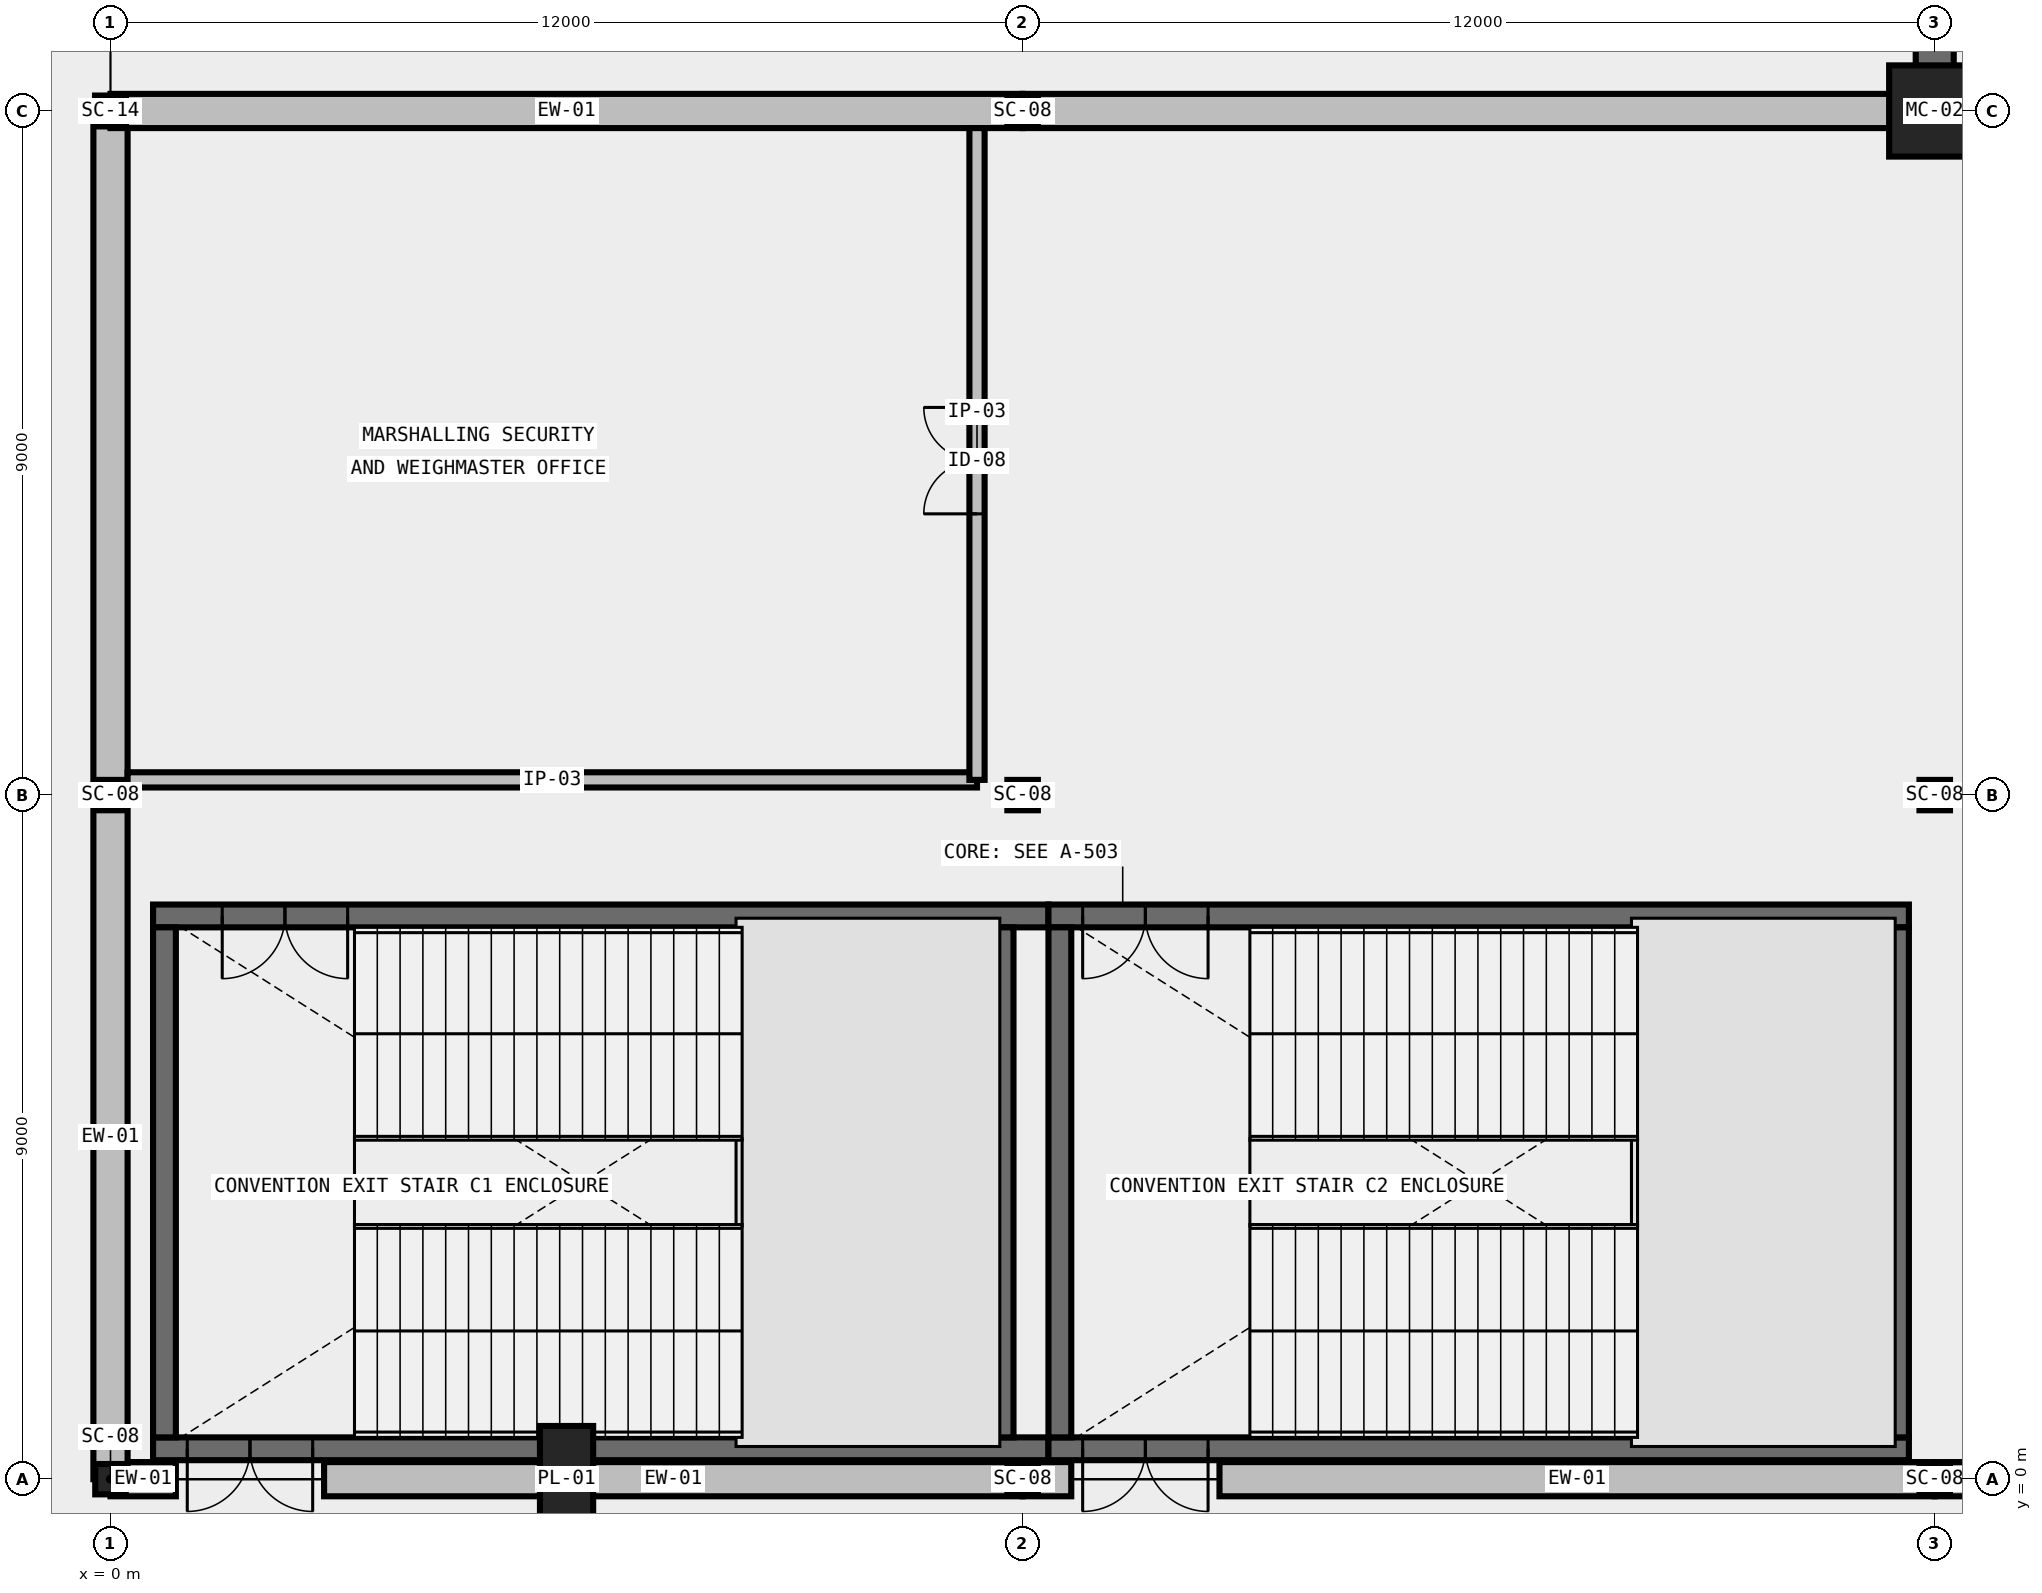
"""IFC4 building model, lengths in metres.
Left out: names, types, materials, properties, quantities, classifications, styles, units other than length and angle.
Written with IfcOpenShell. Run it as: python <this file> out.ifc"""

import sys

from ifc_helpers import new_model, si_unit, direction, frame, frame_2d, origin, origin_with_axes, origin_2d, place, context, subcontext, project, spatial, rectangle, hollow_rectangle, i_section, extrude, element, fill, save


model = new_model("IFC4")
c1 = context("Model", 3, precision=1e-05, world=origin(), true_north=direction((0.0, 1.0)))
c2 = subcontext(c1, "Body", "Model", "MODEL_VIEW")
j1 = project(units=[si_unit("LENGTHUNIT", "METRE"), si_unit("PLANEANGLEUNIT", "RADIAN")], contexts=[c1])
p1 = place(None, origin())
s1 = spatial("IfcSite", under=j1, at=p1, CompositionType="ELEMENT")
p2 = place(p1, origin())
s2 = spatial("IfcBuilding", under=s1, at=p2, CompositionType="ELEMENT")
p3 = place(p2, origin())
s3 = spatial("IfcBuildingStorey", under=s2, at=p3, CompositionType="ELEMENT", Elevation=0.0)
for number, where, z_axis, x_axis in (
    (1, (0.0, 0.0, 0.0), (0.0, 0.0, 1.0), (1.0, 0.0, 0.0)),
    (2, (0.0, 9.0, 0.0), (0.0, 0.0, 1.0), (1.0, 0.0, 0.0)),
):
    element("IfcColumn", number, at=place(p3, frame(where, z_axis=z_axis, x_axis=x_axis)), inside=s3, PredefinedType="COLUMN", context=c2, shape_type="SweptSolid", body=[
        extrude(i_section(OverallWidth=0.401, OverallDepth=0.399, WebThickness=0.025, FlangeThickness=0.04, FilletRadius=0.031, at=origin_2d()), origin(), (0.0, 0.0, 1.0), 6.0),
    ])
p4 = place(p3, frame((0.0, 18.0, 0.0), z_axis=(0.0, 0.0, 1.0), x_axis=(1.0, 0.0, 0.0)))
e3 = element("IfcColumn", 3, at=p4, inside=s3, PredefinedType="COLUMN", context=c2, shape_type="SweptSolid", body=[
    extrude(hollow_rectangle(XDim=0.406, YDim=0.406, WallThickness=0.015, at=origin_2d()), origin(), (0.0, 0.0, 1.0), 6.0),
])
for number, where, z_axis, x_axis in (
    (4, (12.0, 0.0, 0.0), (0.0, 0.0, 1.0), (1.0, 0.0, 0.0)),
    (5, (12.0, 9.0, 0.0), (0.0, 0.0, 1.0), (1.0, 0.0, 0.0)),
    (6, (12.0, 18.0, 0.0), (0.0, 0.0, 1.0), (1.0, 0.0, 0.0)),
    (7, (24.0, 0.0, 0.0), (0.0, 0.0, 1.0), (1.0, 0.0, 0.0)),
    (8, (24.0, 9.0, 0.0), (0.0, 0.0, 1.0), (1.0, 0.0, 0.0)),
):
    element("IfcColumn", number, at=place(p3, frame(where, z_axis=z_axis, x_axis=x_axis)), inside=s3, PredefinedType="COLUMN", context=c2, shape_type="SweptSolid", body=[
        extrude(i_section(OverallWidth=0.401, OverallDepth=0.399, WebThickness=0.025, FlangeThickness=0.04, FilletRadius=0.031, at=origin_2d()), origin(), (0.0, 0.0, 1.0), 6.0),
    ])
p5 = place(p3, frame((24.0, 18.0, 0.0), z_axis=(0.0, 0.0, 1.0), x_axis=(1.0, 0.0, 0.0)))
e9 = element("IfcColumn", 9, at=p5, inside=s3, PredefinedType="COLUMN", context=c2, shape_type="SweptSolid", body=[
    extrude(rectangle(XDim=1.2, YDim=1.2, at=origin_2d()), origin(), (0.0, 0.0, 1.0), 6.0),
])
p6 = place(p3, frame((6.0, 0.0, 0.0), z_axis=(0.0, 0.0, 1.0), x_axis=(1.0, 0.0, 0.0)))
e10 = element("IfcColumn", 10, at=p6, inside=s3, PredefinedType="PILASTER", context=c2, shape_type="SweptSolid", body=[
    extrude(rectangle(XDim=0.7, YDim=1.4, at=origin_2d()), origin(), (0.0, 0.0, 1.0), 6.0),
])
p7 = place(p3, frame((12.34, 0.4, 0.0), z_axis=(0.0, 0.0, 1.0), x_axis=(-1.0, 0.0, 0.0)))
e11 = element("IfcWall", 11, at=p7, inside=s3, PredefinedType="SHEAR", context=c2, shape_type="SweptSolid", body=[
    extrude(rectangle(XDim=11.78, YDim=0.3, at=frame_2d((5.89, 0.0))), origin(), (0.0, 0.0, 1.0), 6.0),
])
p8 = place(p7, frame((9.68, 0.0, 0.0)))
e12 = element("IfcOpeningElement", 12, at=p8, cuts=e11, PredefinedType="OPENING", context=c2, shape_type="SweptSolid", body=[
    extrude(rectangle(XDim=1.65, YDim=2.25, at=frame_2d((0.825, 1.125))), frame((0.0, 0.165, 0.0), z_axis=(0.0, -1.0, 0.0), x_axis=(1.0, 0.0, 0.0)), (0.0, 0.0, 1.0), 0.33),
])
p9 = place(p3, frame((12.34, 7.41, 0.0), z_axis=(0.0, 0.0, 1.0), x_axis=(-1.0, 0.0, 0.0)))
e13 = element("IfcWall", 13, at=p9, inside=s3, PredefinedType="SHEAR", context=c2, shape_type="SweptSolid", body=[
    extrude(rectangle(XDim=11.78, YDim=0.3, at=frame_2d((5.89, 0.0))), origin(), (0.0, 0.0, 1.0), 6.0),
])
p10 = place(p9, frame((9.22, 0.0, 0.0)))
e14 = element("IfcOpeningElement", 14, at=p10, cuts=e13, PredefinedType="OPENING", context=c2, shape_type="SweptSolid", body=[
    extrude(rectangle(XDim=1.65, YDim=2.25, at=frame_2d((0.825, 1.125))), frame((0.0, 0.165, 0.0), z_axis=(0.0, -1.0, 0.0), x_axis=(1.0, 0.0, 0.0)), (0.0, 0.0, 1.0), 0.33),
])
for number, where, z_axis, x_axis in (
    (15, (0.71, 7.26, 0.0), (0.0, 0.0, 1.0), (0.0, -1.0, 0.0)),
    (16, (11.73, 0.55, 0.0), (0.0, 0.0, 1.0), (0.0, 1.0, 0.0)),
):
    element("IfcWall", number, at=place(p3, frame(where, z_axis=z_axis, x_axis=x_axis)), inside=s3, PredefinedType="SHEAR", context=c2, shape_type="SweptSolid", body=[
        extrude(rectangle(XDim=6.71, YDim=0.3, at=frame_2d((3.355, 0.0))), origin(), (0.0, 0.0, 1.0), 6.0),
    ])
p11 = place(p3, frame((23.66, 0.4, 0.0), z_axis=(0.0, 0.0, 1.0), x_axis=(-1.0, 0.0, 0.0)))
e17 = element("IfcWall", 17, at=p11, inside=s3, PredefinedType="SHEAR", context=c2, shape_type="SweptSolid", body=[
    extrude(rectangle(XDim=11.32, YDim=0.3, at=frame_2d((5.66, 0.0))), origin(), (0.0, 0.0, 1.0), 6.0),
])
p12 = place(p11, frame((9.22, 0.0, 0.0)))
e18 = element("IfcOpeningElement", 18, at=p12, cuts=e17, PredefinedType="OPENING", context=c2, shape_type="SweptSolid", body=[
    extrude(rectangle(XDim=1.65, YDim=2.25, at=frame_2d((0.825, 1.125))), frame((0.0, 0.165, 0.0), z_axis=(0.0, -1.0, 0.0), x_axis=(1.0, 0.0, 0.0)), (0.0, 0.0, 1.0), 0.33),
])
p13 = place(p3, frame((23.66, 7.41, 0.0), z_axis=(0.0, 0.0, 1.0), x_axis=(-1.0, 0.0, 0.0)))
e19 = element("IfcWall", 19, at=p13, inside=s3, PredefinedType="SHEAR", context=c2, shape_type="SweptSolid", body=[
    extrude(rectangle(XDim=11.32, YDim=0.3, at=frame_2d((5.66, 0.0))), origin(), (0.0, 0.0, 1.0), 6.0),
])
p14 = place(p13, frame((9.22, 0.0, 0.0)))
e20 = element("IfcOpeningElement", 20, at=p14, cuts=e19, PredefinedType="OPENING", context=c2, shape_type="SweptSolid", body=[
    extrude(rectangle(XDim=1.65, YDim=2.25, at=frame_2d((0.825, 1.125))), frame((0.0, 0.165, 0.0), z_axis=(0.0, -1.0, 0.0), x_axis=(1.0, 0.0, 0.0)), (0.0, 0.0, 1.0), 0.33),
])
for number, where, z_axis, x_axis in (
    (21, (12.49, 7.26, 0.0), (0.0, 0.0, 1.0), (0.0, -1.0, 0.0)),
    (22, (23.51, 0.55, 0.0), (0.0, 0.0, 1.0), (0.0, 1.0, 0.0)),
):
    element("IfcWall", number, at=place(p3, frame(where, z_axis=z_axis, x_axis=x_axis)), inside=s3, PredefinedType="SHEAR", context=c2, shape_type="SweptSolid", body=[
        extrude(rectangle(XDim=6.71, YDim=0.3, at=frame_2d((3.355, 0.0))), origin(), (0.0, 0.0, 1.0), 6.0),
    ])
p15 = place(p3, origin_with_axes())
e23 = element("IfcWall", 23, at=p15, inside=s3, PredefinedType="STANDARD", context=c2, shape_type="SweptSolid", body=[
    extrude(rectangle(XDim=0.86, YDim=0.45, at=frame_2d((0.43, 0.0))), origin(), (0.0, 0.0, 1.0), 4.676),
])
p16 = place(p3, frame((2.81, 0.0, 0.0), z_axis=(0.0, 0.0, 1.0), x_axis=(1.0, 0.0, 0.0)))
e24 = element("IfcWall", 24, at=p16, inside=s3, PredefinedType="STANDARD", context=c2, shape_type="SweptSolid", body=[
    extrude(rectangle(XDim=9.19, YDim=0.45, at=frame_2d((4.595, 0.0))), origin(), (0.0, 0.0, 1.0), 4.676),
])
p17 = place(p3, frame((12.0, 0.0, 0.0), z_axis=(0.0, 0.0, 1.0), x_axis=(1.0, 0.0, 0.0)))
e25 = element("IfcWall", 25, at=p17, inside=s3, PredefinedType="STANDARD", context=c2, shape_type="SweptSolid", body=[
    extrude(rectangle(XDim=0.64, YDim=0.45, at=frame_2d((0.32, 0.0))), origin(), (0.0, 0.0, 1.0), 4.676),
])
p18 = place(p3, frame((14.59, 0.0, 0.0), z_axis=(0.0, 0.0, 1.0), x_axis=(1.0, 0.0, 0.0)))
e26 = element("IfcWall", 26, at=p18, inside=s3, PredefinedType="STANDARD", context=c2, shape_type="SweptSolid", body=[
    extrude(rectangle(XDim=9.41, YDim=0.45, at=frame_2d((4.705, 0.0))), origin(), (0.0, 0.0, 1.0), 4.676),
])
p19 = place(p3, frame((24.0, 0.0, 0.0), z_axis=(0.0, 0.0, 1.0), x_axis=(1.0, 0.0, 0.0)))
e27 = element("IfcWall", 27, at=p19, inside=s3, PredefinedType="STANDARD", context=c2, shape_type="SweptSolid", body=[
    extrude(rectangle(XDim=6.0, YDim=0.45, at=frame_2d((3.0, 0.0))), origin(), (0.0, 0.0, 1.0), 4.676),
])
for number, where, z_axis, x_axis in (
    (28, (0.0, 9.0, 0.0), (0.0, 0.0, 1.0), (0.0, -1.0, 0.0)),
    (29, (0.0, 18.0, 0.0), (0.0, 0.0, 1.0), (0.0, -1.0, 0.0)),
):
    element("IfcWall", number, at=place(p3, frame(where, z_axis=z_axis, x_axis=x_axis)), inside=s3, PredefinedType="STANDARD", context=c2, shape_type="SweptSolid", body=[
        extrude(rectangle(XDim=9.0, YDim=0.45, at=frame_2d((4.5, 0.0))), origin(), (0.0, 0.0, 1.0), 5.269),
    ])
for number, where, z_axis, x_axis in (
    (30, (0.0, 18.0, 0.0), (0.0, 0.0, 1.0), (1.0, 0.0, 0.0)),
    (31, (12.0, 18.0, 0.0), (0.0, 0.0, 1.0), (1.0, 0.0, 0.0)),
):
    element("IfcWall", number, at=place(p3, frame(where, z_axis=z_axis, x_axis=x_axis)), inside=s3, PredefinedType="STANDARD", context=c2, shape_type="SweptSolid", body=[
        extrude(rectangle(XDim=12.0, YDim=0.45, at=frame_2d((6.0, 0.0))), origin(), (0.0, 0.0, 1.0), 4.902),
    ])
p20 = place(p3, frame((24.0, 27.0, 0.0), z_axis=(0.0, 0.0, 1.0), x_axis=(0.0, -1.0, 0.0)))
e32 = element("IfcWall", 32, at=p20, inside=s3, PredefinedType="SHEAR", context=c2, shape_type="SweptSolid", body=[
    extrude(rectangle(XDim=9.0, YDim=0.5, at=frame_2d((4.5, 0.0))), origin(), (0.0, 0.0, 1.0), 6.0),
])
p21 = place(p20, frame((2.7, 0.0, 0.0)))
e33 = element("IfcOpeningElement", 33, at=p21, cuts=e32, PredefinedType="OPENING", context=c2, shape_type="SweptSolid", body=[
    extrude(rectangle(XDim=3.6, YDim=4.2, at=frame_2d((1.8, 2.1))), frame((0.0, 0.265, 0.0), z_axis=(0.0, -1.0, 0.0), x_axis=(1.0, 0.0, 0.0)), (0.0, 0.0, 1.0), 0.53),
])
p22 = place(p3, frame((24.0, 18.0, 0.0), z_axis=(0.0, 0.0, 1.0), x_axis=(1.0, 0.0, 0.0)))
e34 = element("IfcWall", 34, at=p22, inside=s3, PredefinedType="PARTITIONING", context=c2, shape_type="SweptSolid", body=[
    extrude(rectangle(XDim=90.0, YDim=0.28, at=frame_2d((45.0, 0.0))), origin(), (0.0, 0.0, 1.0), 4.902),
])
p23 = place(p22, frame((10.8, 0.0, 0.0)))
e35 = element("IfcOpeningElement", 35, at=p23, cuts=e34, PredefinedType="OPENING", context=c2, shape_type="SweptSolid", body=[
    extrude(rectangle(XDim=2.4, YDim=2.6, at=frame_2d((1.2, 1.3))), frame((0.0, 0.155, 0.0), z_axis=(0.0, -1.0, 0.0), x_axis=(1.0, 0.0, 0.0)), (0.0, 0.0, 1.0), 0.31),
])
p24 = place(p22, frame((22.8, 0.0, 0.0)))
e36 = element("IfcOpeningElement", 36, at=p24, cuts=e34, PredefinedType="OPENING", context=c2, shape_type="SweptSolid", body=[
    extrude(rectangle(XDim=2.4, YDim=2.6, at=frame_2d((1.2, 1.3))), frame((0.0, 0.155, 0.0), z_axis=(0.0, -1.0, 0.0), x_axis=(1.0, 0.0, 0.0)), (0.0, 0.0, 1.0), 0.31),
])
p25 = place(p22, frame((34.8, 0.0, 0.0)))
e37 = element("IfcOpeningElement", 37, at=p25, cuts=e34, PredefinedType="OPENING", context=c2, shape_type="SweptSolid", body=[
    extrude(rectangle(XDim=2.4, YDim=2.6, at=frame_2d((1.2, 1.3))), frame((0.0, 0.155, 0.0), z_axis=(0.0, -1.0, 0.0), x_axis=(1.0, 0.0, 0.0)), (0.0, 0.0, 1.0), 0.31),
])
p26 = place(p22, frame((50.63, 0.0, 0.0)))
e38 = element("IfcOpeningElement", 38, at=p26, cuts=e34, PredefinedType="OPENING", context=c2, shape_type="SweptSolid", body=[
    extrude(rectangle(XDim=2.4, YDim=2.6, at=frame_2d((1.2, 1.3))), frame((0.0, 0.155, 0.0), z_axis=(0.0, -1.0, 0.0), x_axis=(1.0, 0.0, 0.0)), (0.0, 0.0, 1.0), 0.31),
])
p27 = place(p22, frame((62.63, 0.0, 0.0)))
e39 = element("IfcOpeningElement", 39, at=p27, cuts=e34, PredefinedType="OPENING", context=c2, shape_type="SweptSolid", body=[
    extrude(rectangle(XDim=2.4, YDim=2.6, at=frame_2d((1.2, 1.3))), frame((0.0, 0.155, 0.0), z_axis=(0.0, -1.0, 0.0), x_axis=(1.0, 0.0, 0.0)), (0.0, 0.0, 1.0), 0.31),
])
p28 = place(p22, frame((74.63, 0.0, 0.0)))
e40 = element("IfcOpeningElement", 40, at=p28, cuts=e34, PredefinedType="OPENING", context=c2, shape_type="SweptSolid", body=[
    extrude(rectangle(XDim=2.4, YDim=2.6, at=frame_2d((1.2, 1.3))), frame((0.0, 0.155, 0.0), z_axis=(0.0, -1.0, 0.0), x_axis=(1.0, 0.0, 0.0)), (0.0, 0.0, 1.0), 0.31),
])
p29 = place(p3, frame((0.225, 9.2, 0.0), z_axis=(0.0, 0.0, 1.0), x_axis=(1.0, 0.0, 0.0)))
e41 = element("IfcWall", 41, at=p29, inside=s3, PredefinedType="PARTITIONING", context=c2, shape_type="SweptSolid", body=[
    extrude(rectangle(XDim=11.175, YDim=0.2, at=frame_2d((5.587, 0.0))), origin(), (0.0, 0.0, 1.0), 5.68),
])
p30 = place(p3, frame((11.4, 9.2, 0.0), z_axis=(0.0, 0.0, 1.0), x_axis=(0.0, 1.0, 0.0)))
e42 = element("IfcWall", 42, at=p30, inside=s3, PredefinedType="PARTITIONING", context=c2, shape_type="SweptSolid", body=[
    extrude(rectangle(XDim=8.575, YDim=0.2, at=frame_2d((4.288, 0.0))), origin(), (0.0, 0.0, 1.0), 5.68),
])
p31 = place(p30, frame((3.5, 0.0, 0.0)))
e43 = element("IfcOpeningElement", 43, at=p31, cuts=e42, PredefinedType="OPENING", context=c2, shape_type="SweptSolid", body=[
    extrude(rectangle(XDim=1.4, YDim=2.2, at=frame_2d((0.7, 1.1))), frame((0.0, 0.115, 0.0), z_axis=(0.0, -1.0, 0.0), x_axis=(1.0, 0.0, 0.0)), (0.0, 0.0, 1.0), 0.23),
])
p32 = place(p10, origin())
e44 = element("IfcDoor", 44, at=p32, inside=s3, OperationType="DOUBLE_DOOR_SINGLE_SWING", PredefinedType="DOOR", context=c2, shape_type="SweptSolid", body=[
    extrude(rectangle(XDim=1.65, YDim=2.25, at=frame_2d((0.825, 1.125))), frame((0.0, 0.025, 0.0), z_axis=(0.0, -1.0, 0.0), x_axis=(1.0, 0.0, 0.0)), (0.0, 0.0, 1.0), 0.05),
])
fill(e14, e44)
p33 = place(p8, origin())
e45 = element("IfcDoor", 45, at=p33, inside=s3, OperationType="DOUBLE_DOOR_SINGLE_SWING", PredefinedType="DOOR", context=c2, shape_type="SweptSolid", body=[
    extrude(rectangle(XDim=1.65, YDim=2.25, at=frame_2d((0.825, 1.125))), frame((0.0, 0.025, 0.0), z_axis=(0.0, -1.0, 0.0), x_axis=(1.0, 0.0, 0.0)), (0.0, 0.0, 1.0), 0.05),
])
fill(e12, e45)
p34 = place(p14, origin())
e46 = element("IfcDoor", 46, at=p34, inside=s3, OperationType="DOUBLE_DOOR_SINGLE_SWING", PredefinedType="DOOR", context=c2, shape_type="SweptSolid", body=[
    extrude(rectangle(XDim=1.65, YDim=2.25, at=frame_2d((0.825, 1.125))), frame((0.0, 0.025, 0.0), z_axis=(0.0, -1.0, 0.0), x_axis=(1.0, 0.0, 0.0)), (0.0, 0.0, 1.0), 0.05),
])
fill(e20, e46)
p35 = place(p12, origin())
e47 = element("IfcDoor", 47, at=p35, inside=s3, OperationType="DOUBLE_DOOR_SINGLE_SWING", PredefinedType="DOOR", context=c2, shape_type="SweptSolid", body=[
    extrude(rectangle(XDim=1.65, YDim=2.25, at=frame_2d((0.825, 1.125))), frame((0.0, 0.025, 0.0), z_axis=(0.0, -1.0, 0.0), x_axis=(1.0, 0.0, 0.0)), (0.0, 0.0, 1.0), 0.05),
])
fill(e18, e47)
p36 = place(p31, origin())
e48 = element("IfcDoor", 48, at=p36, inside=s3, OperationType="DOUBLE_DOOR_SINGLE_SWING", PredefinedType="DOOR", context=c2, shape_type="SweptSolid", body=[
    extrude(rectangle(XDim=1.4, YDim=2.2, at=frame_2d((0.7, 1.1))), frame((0.0, 0.025, 0.0), z_axis=(0.0, -1.0, 0.0), x_axis=(1.0, 0.0, 0.0)), (0.0, 0.0, 1.0), 0.05),
])
fill(e43, e48)
save(model, sys.argv[1])
